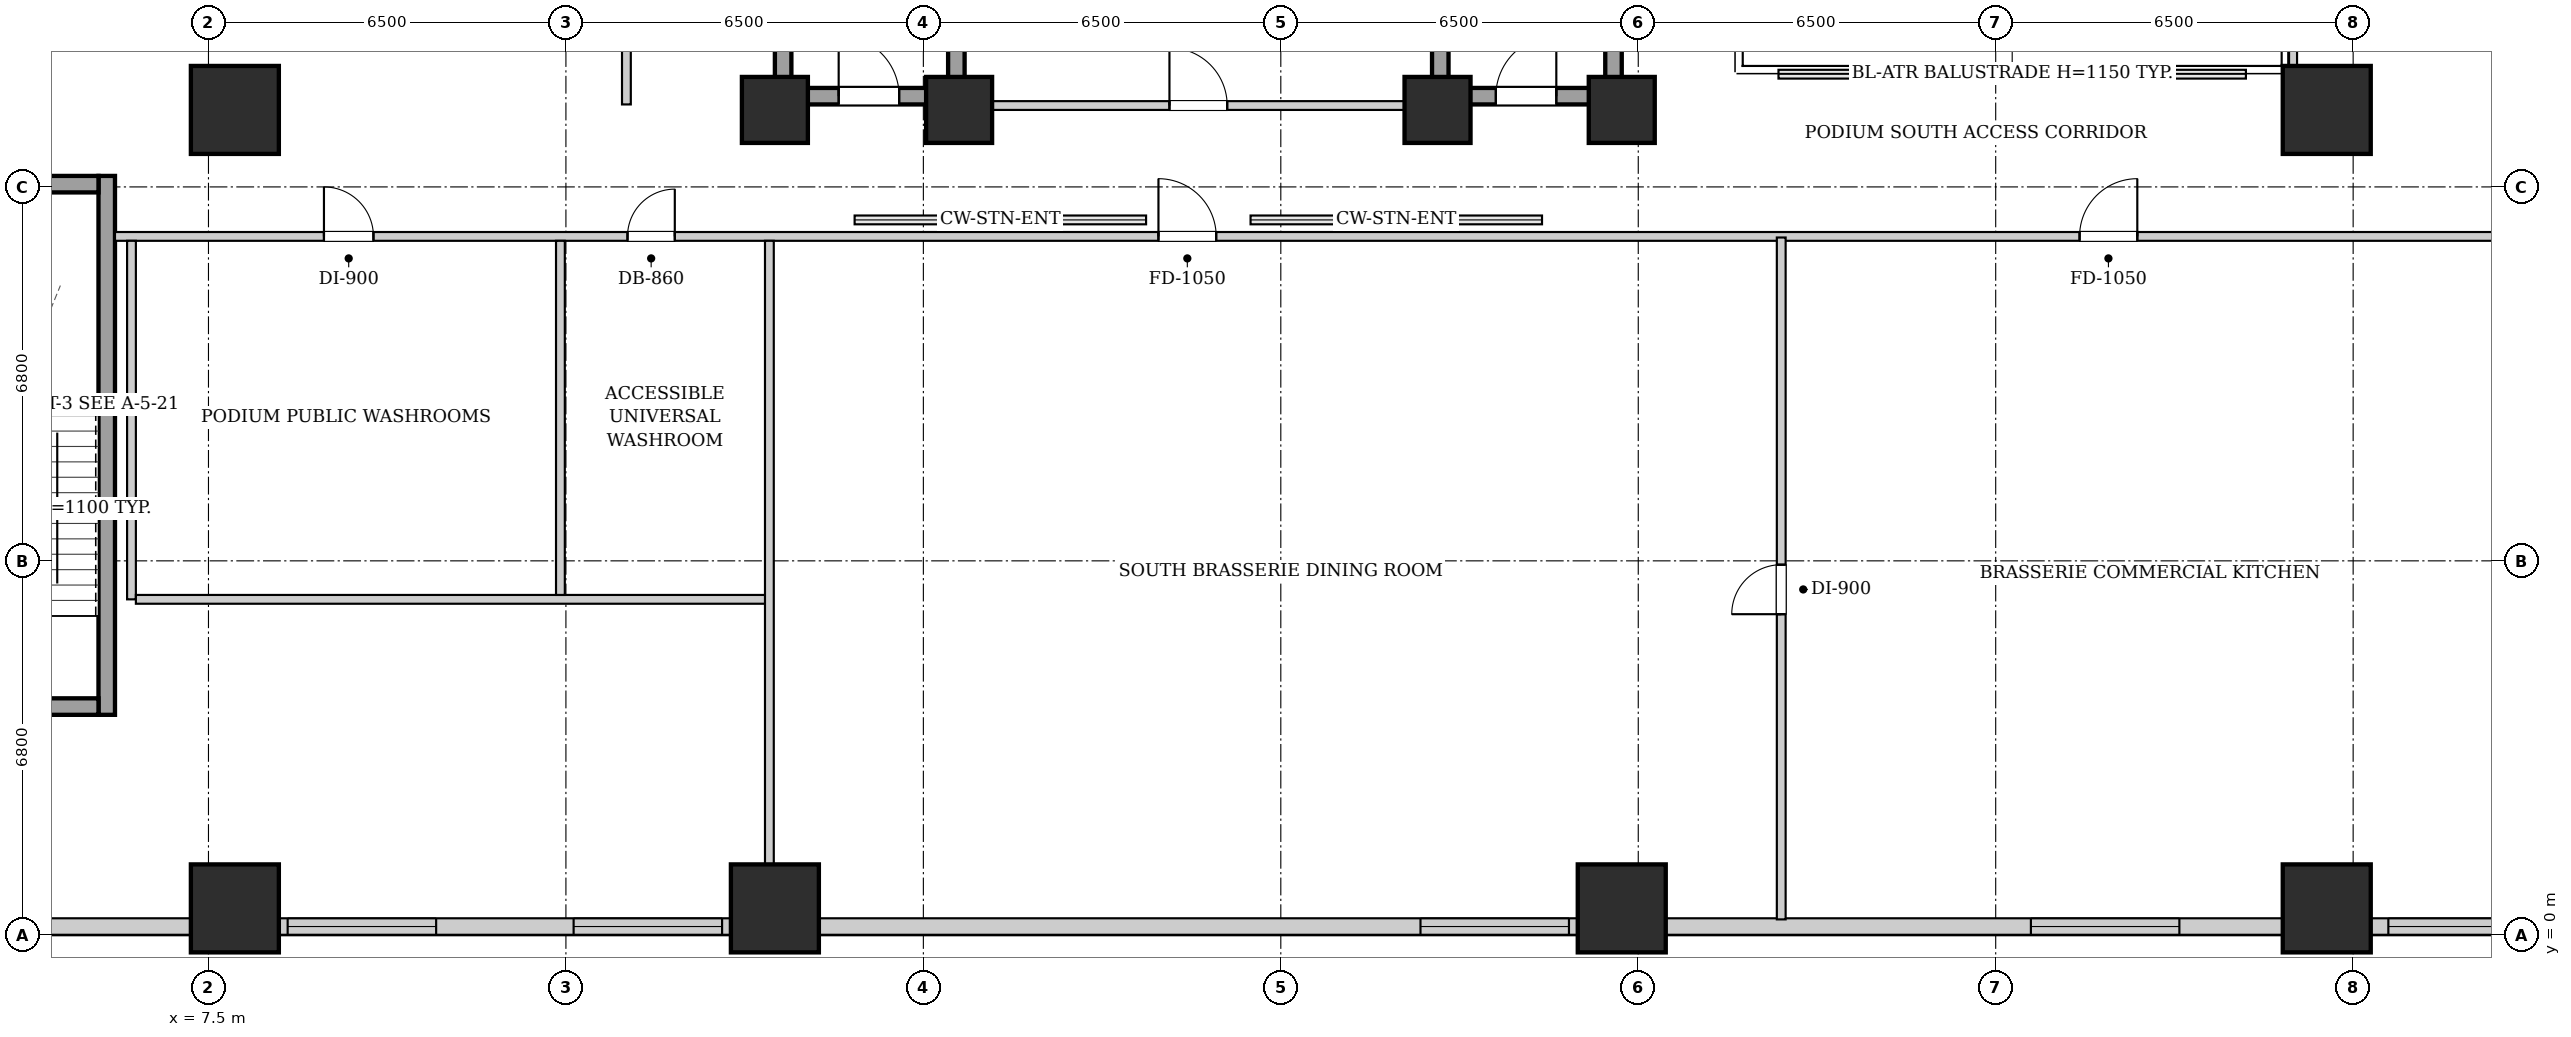
"""IFC4 building model, lengths in metres.
Left out: names, types, materials, properties, quantities, classifications, styles, units other than length and angle.
Written with IfcOpenShell. Run it as: python <this file> out.ifc"""

import sys

from ifc_helpers import new_model, si_unit, direction, frame, frame_2d, origin, origin_2d, place, context, subcontext, project, spatial, rectangle, extrude, element, fill, save


model = new_model("IFC4")
c1 = context("Model", 3, precision=1e-05, world=origin(), true_north=direction((0.0, 1.0)))
c2 = subcontext(c1, "Body", "Model", "MODEL_VIEW")
j1 = project(units=[si_unit("LENGTHUNIT", "METRE"), si_unit("PLANEANGLEUNIT", "RADIAN")], contexts=[c1])
p1 = place(None, origin())
s1 = spatial("IfcSite", under=j1, at=p1, CompositionType="ELEMENT")
p2 = place(p1, origin())
s2 = spatial("IfcBuilding", under=s1, at=p2, CompositionType="ELEMENT")
p3 = place(p2, frame((0.0, 0.0, 6.0)))
s3 = spatial("IfcBuildingStorey", under=s2, at=p3, CompositionType="ELEMENT", Elevation=6.0)
for number, where, z_axis, x_axis in (
    (1, (7.98, 0.48, 0.0), (0.0, 0.0, 1.0), (1.0, 0.0, 0.0)),
    (2, (7.98, 15.0, 0.0), (0.0, 0.0, 1.0), (1.0, 0.0, 0.0)),
    (3, (46.02, 0.48, 0.0), (0.0, 0.0, 1.0), (1.0, 0.0, 0.0)),
    (4, (46.02, 15.0, 0.0), (0.0, 0.0, 1.0), (1.0, 0.0, 0.0)),
    (5, (17.8, 0.48, 0.0), (0.0, 0.0, 1.0), (1.0, 0.0, 0.0)),
    (6, (33.2, 0.48, 0.0), (0.0, 0.0, 1.0), (1.0, 0.0, 0.0)),
):
    element("IfcColumn", number, at=place(p3, frame(where, z_axis=z_axis, x_axis=x_axis)), inside=s3, PredefinedType="COLUMN", context=c2, shape_type="SweptSolid", body=[
        extrude(rectangle(XDim=1.6, YDim=1.6, at=origin_2d()), origin(), (0.0, 0.0, 1.0), 5.2),
    ])
for number, where, z_axis, x_axis in (
    (7, (17.8, 15.0, 0.0), (0.0, 0.0, 1.0), (1.0, 0.0, 0.0)),
    (8, (21.15, 15.0, 0.0), (0.0, 0.0, 1.0), (1.0, 0.0, 0.0)),
    (9, (29.85, 15.0, 0.0), (0.0, 0.0, 1.0), (1.0, 0.0, 0.0)),
    (10, (33.2, 15.0, 0.0), (0.0, 0.0, 1.0), (1.0, 0.0, 0.0)),
):
    element("IfcColumn", number, at=place(p3, frame(where, z_axis=z_axis, x_axis=x_axis)), inside=s3, PredefinedType="COLUMN", context=c2, shape_type="SweptSolid", body=[
        extrude(rectangle(XDim=1.2, YDim=1.2, at=origin_2d()), origin(), (0.0, 0.0, 1.0), 5.2),
    ])
p4 = place(p3, frame((53.84, 0.15, 0.0), z_axis=(0.0, 0.0, 1.0), x_axis=(-1.0, 0.0, 0.0)))
e11 = element("IfcWall", 11, at=p4, inside=s3, PredefinedType="SOLIDWALL", context=c2, shape_type="SweptSolid", body=[
    extrude(rectangle(XDim=53.68, YDim=0.3, at=frame_2d((26.84, 0.0))), origin(), (0.0, 0.0, 1.0), 3.765),
])
p5 = place(p4, frame((4.0, 0.0, 0.9)))
e12 = element("IfcOpeningElement", 12, at=p5, cuts=e11, PredefinedType="OPENING", context=c2, shape_type="SweptSolid", body=[
    extrude(rectangle(XDim=2.7, YDim=2.1, at=frame_2d((1.35, 1.05))), frame((0.0, 0.16, 0.0), z_axis=(0.0, -1.0, 0.0), x_axis=(1.0, 0.0, 0.0)), (0.0, 0.0, 1.0), 0.32),
])
p6 = place(p4, frame((10.5, 0.0, 0.9)))
e13 = element("IfcOpeningElement", 13, at=p6, cuts=e11, PredefinedType="OPENING", context=c2, shape_type="SweptSolid", body=[
    extrude(rectangle(XDim=2.7, YDim=2.1, at=frame_2d((1.35, 1.05))), frame((0.0, 0.16, 0.0), z_axis=(0.0, -1.0, 0.0), x_axis=(1.0, 0.0, 0.0)), (0.0, 0.0, 1.0), 0.32),
])
p7 = place(p4, frame((21.6, 0.0, 0.9)))
e14 = element("IfcOpeningElement", 14, at=p7, cuts=e11, PredefinedType="OPENING", context=c2, shape_type="SweptSolid", body=[
    extrude(rectangle(XDim=2.7, YDim=2.1, at=frame_2d((1.35, 1.05))), frame((0.0, 0.16, 0.0), z_axis=(0.0, -1.0, 0.0), x_axis=(1.0, 0.0, 0.0)), (0.0, 0.0, 1.0), 0.32),
])
p8 = place(p4, frame((37.0, 0.0, 0.9)))
e15 = element("IfcOpeningElement", 15, at=p8, cuts=e11, PredefinedType="OPENING", context=c2, shape_type="SweptSolid", body=[
    extrude(rectangle(XDim=2.7, YDim=2.1, at=frame_2d((1.35, 1.05))), frame((0.0, 0.16, 0.0), z_axis=(0.0, -1.0, 0.0), x_axis=(1.0, 0.0, 0.0)), (0.0, 0.0, 1.0), 0.32),
])
p9 = place(p4, frame((42.2, 0.0, 0.9)))
e16 = element("IfcOpeningElement", 16, at=p9, cuts=e11, PredefinedType="OPENING", context=c2, shape_type="SweptSolid", body=[
    extrude(rectangle(XDim=2.7, YDim=2.1, at=frame_2d((1.35, 1.05))), frame((0.0, 0.16, 0.0), z_axis=(0.0, -1.0, 0.0), x_axis=(1.0, 0.0, 0.0)), (0.0, 0.0, 1.0), 0.32),
])
for number, where, z_axis, x_axis in (
    (17, (17.95, 15.1, 0.0), (0.0, 0.0, 1.0), (0.0, 1.0, 0.0)),
    (18, (21.1, 15.1, 0.0), (0.0, 0.0, 1.0), (0.0, 1.0, 0.0)),
):
    element("IfcWall", number, at=place(p3, frame(where, z_axis=z_axis, x_axis=x_axis)), inside=s3, PredefinedType="SHEAR", context=c2, shape_type="SweptSolid", body=[
        extrude(rectangle(XDim=9.0, YDim=0.3, at=frame_2d((4.5, 0.0))), origin(), (0.0, 0.0, 1.0), 4.88),
    ])
p10 = place(p3, frame((18.1, 15.25, 0.0), z_axis=(0.0, 0.0, 1.0), x_axis=(1.0, 0.0, 0.0)))
e19 = element("IfcWall", 19, at=p10, inside=s3, PredefinedType="SHEAR", context=c2, shape_type="SweptSolid", body=[
    extrude(rectangle(XDim=2.85, YDim=0.3, at=frame_2d((1.425, 0.0))), origin(), (0.0, 0.0, 1.0), 4.88),
])
p11 = place(p10, frame((0.86, 0.0, 0.0)))
e20 = element("IfcOpeningElement", 20, at=p11, cuts=e19, PredefinedType="OPENING", context=c2, shape_type="SweptSolid", body=[
    extrude(rectangle(XDim=1.1, YDim=2.05, at=frame_2d((0.55, 1.025))), frame((0.0, 0.16, 0.0), z_axis=(0.0, -1.0, 0.0), x_axis=(1.0, 0.0, 0.0)), (0.0, 0.0, 1.0), 0.32),
])
for number, where, z_axis, x_axis in (
    (21, (29.9, 15.1, 0.0), (0.0, 0.0, 1.0), (0.0, 1.0, 0.0)),
    (22, (33.05, 15.1, 0.0), (0.0, 0.0, 1.0), (0.0, 1.0, 0.0)),
):
    element("IfcWall", number, at=place(p3, frame(where, z_axis=z_axis, x_axis=x_axis)), inside=s3, PredefinedType="SHEAR", context=c2, shape_type="SweptSolid", body=[
        extrude(rectangle(XDim=9.0, YDim=0.3, at=frame_2d((4.5, 0.0))), origin(), (0.0, 0.0, 1.0), 4.88),
    ])
p12 = place(p3, frame((30.05, 15.25, 0.0), z_axis=(0.0, 0.0, 1.0), x_axis=(1.0, 0.0, 0.0)))
e23 = element("IfcWall", 23, at=p12, inside=s3, PredefinedType="SHEAR", context=c2, shape_type="SweptSolid", body=[
    extrude(rectangle(XDim=2.85, YDim=0.3, at=frame_2d((1.425, 0.0))), origin(), (0.0, 0.0, 1.0), 4.88),
])
p13 = place(p12, frame((0.86, 0.0, 0.0)))
e24 = element("IfcOpeningElement", 24, at=p13, cuts=e23, PredefinedType="OPENING", context=c2, shape_type="SweptSolid", body=[
    extrude(rectangle(XDim=1.1, YDim=2.05, at=frame_2d((0.55, 1.025))), frame((0.0, 0.16, 0.0), z_axis=(0.0, -1.0, 0.0), x_axis=(1.0, 0.0, 0.0)), (0.0, 0.0, 1.0), 0.32),
])
p14 = place(p3, frame((5.65, 4.0, 0.0), z_axis=(0.0, 0.0, 1.0), x_axis=(0.0, 1.0, 0.0)))
e25 = element("IfcWall", 25, at=p14, inside=s3, PredefinedType="SHEAR", context=c2, shape_type="SweptSolid", body=[
    extrude(rectangle(XDim=9.8, YDim=0.3, at=frame_2d((4.9, 0.0))), origin(), (0.0, 0.0, 1.0), 4.88),
])
p15 = place(p3, frame((2.35, 13.65, 0.0), z_axis=(0.0, 0.0, 1.0), x_axis=(1.0, 0.0, 0.0)))
e26 = element("IfcWall", 26, at=p15, inside=s3, PredefinedType="SHEAR", context=c2, shape_type="SweptSolid", body=[
    extrude(rectangle(XDim=3.15, YDim=0.3, at=frame_2d((1.575, 0.0))), origin(), (0.0, 0.0, 1.0), 4.88),
])
p16 = place(p3, frame((2.35, 4.15, 0.0), z_axis=(0.0, 0.0, 1.0), x_axis=(1.0, 0.0, 0.0)))
e27 = element("IfcWall", 27, at=p16, inside=s3, PredefinedType="SHEAR", context=c2, shape_type="SweptSolid", body=[
    extrude(rectangle(XDim=3.15, YDim=0.3, at=frame_2d((1.575, 0.0))), origin(), (0.0, 0.0, 1.0), 4.88),
])
p17 = place(p16, frame((1.02, 0.0, 0.0)))
e28 = element("IfcOpeningElement", 28, at=p17, cuts=e27, PredefinedType="OPENING", context=c2, shape_type="SweptSolid", body=[
    extrude(rectangle(XDim=1.1, YDim=2.05, at=frame_2d((0.55, 1.025))), frame((0.0, 0.16, 0.0), z_axis=(0.0, -1.0, 0.0), x_axis=(1.0, 0.0, 0.0)), (0.0, 0.0, 1.0), 0.32),
])
p18 = place(p3, frame((21.25, 15.08, 0.0), z_axis=(0.0, 0.0, 1.0), x_axis=(1.0, 0.0, 0.0)))
e29 = element("IfcWall", 29, at=p18, inside=s3, PredefinedType="PARTITIONING", context=c2, shape_type="SweptSolid", body=[
    extrude(rectangle(XDim=8.5, YDim=0.16, at=frame_2d((4.25, 0.0))), origin(), (0.0, 0.0, 1.0), 4.88),
])
p19 = place(p18, frame((3.725, 0.0, 0.0)))
e30 = element("IfcOpeningElement", 30, at=p19, cuts=e29, PredefinedType="OPENING", context=c2, shape_type="SweptSolid", body=[
    extrude(rectangle(XDim=1.05, YDim=2.05, at=frame_2d((0.525, 1.025))), frame((0.0, 0.09, 0.0), z_axis=(0.0, -1.0, 0.0), x_axis=(1.0, 0.0, 0.0)), (0.0, 0.0, 1.0), 0.18),
])
p20 = place(p3, frame((5.8, 12.7, 0.0), z_axis=(0.0, 0.0, 1.0), x_axis=(1.0, 0.0, 0.0)))
e31 = element("IfcWall", 31, at=p20, inside=s3, PredefinedType="PARTITIONING", context=c2, shape_type="SweptSolid", body=[
    extrude(rectangle(XDim=47.92, YDim=0.16, at=frame_2d((23.96, 0.0))), origin(), (0.0, 0.0, 1.0), 4.88),
])
p21 = place(p20, frame((3.8, 0.0, 0.0)))
e32 = element("IfcOpeningElement", 32, at=p21, cuts=e31, PredefinedType="OPENING", context=c2, shape_type="SweptSolid", body=[
    extrude(rectangle(XDim=0.9, YDim=2.05, at=frame_2d((0.45, 1.025))), frame((0.0, 0.09, 0.0), z_axis=(0.0, -1.0, 0.0), x_axis=(1.0, 0.0, 0.0)), (0.0, 0.0, 1.0), 0.18),
])
p22 = place(p20, frame((9.32, 0.0, 0.0)))
e33 = element("IfcOpeningElement", 33, at=p22, cuts=e31, PredefinedType="OPENING", context=c2, shape_type="SweptSolid", body=[
    extrude(rectangle(XDim=0.86, YDim=2.05, at=frame_2d((0.43, 1.025))), frame((0.0, 0.09, 0.0), z_axis=(0.0, -1.0, 0.0), x_axis=(1.0, 0.0, 0.0)), (0.0, 0.0, 1.0), 0.18),
])
p23 = place(p20, frame((18.975, 0.0, 0.0)))
e34 = element("IfcOpeningElement", 34, at=p23, cuts=e31, PredefinedType="OPENING", context=c2, shape_type="SweptSolid", body=[
    extrude(rectangle(XDim=1.05, YDim=2.05, at=frame_2d((0.525, 1.025))), frame((0.0, 0.09, 0.0), z_axis=(0.0, -1.0, 0.0), x_axis=(1.0, 0.0, 0.0)), (0.0, 0.0, 1.0), 0.18),
])
p24 = place(p20, frame((35.725, 0.0, 0.0)))
e35 = element("IfcOpeningElement", 35, at=p24, cuts=e31, PredefinedType="OPENING", context=c2, shape_type="SweptSolid", body=[
    extrude(rectangle(XDim=1.05, YDim=2.05, at=frame_2d((0.525, 1.025))), frame((0.0, 0.09, 0.0), z_axis=(0.0, -1.0, 0.0), x_axis=(1.0, 0.0, 0.0)), (0.0, 0.0, 1.0), 0.18),
])
p25 = place(p3, frame((6.1, 6.1, 0.0), z_axis=(0.0, 0.0, 1.0), x_axis=(0.0, 1.0, 0.0)))
e36 = element("IfcWall", 36, at=p25, inside=s3, PredefinedType="PARTITIONING", context=c2, shape_type="SweptSolid", body=[
    extrude(rectangle(XDim=6.52, YDim=0.16, at=frame_2d((3.26, 0.0))), origin(), (0.0, 0.0, 1.0), 4.88),
])
p26 = place(p3, frame((6.18, 6.1, 0.0), z_axis=(0.0, 0.0, 1.0), x_axis=(1.0, 0.0, 0.0)))
e37 = element("IfcWall", 37, at=p26, inside=s3, PredefinedType="PARTITIONING", context=c2, shape_type="SweptSolid", body=[
    extrude(rectangle(XDim=11.5, YDim=0.16, at=frame_2d((5.75, 0.0))), origin(), (0.0, 0.0, 1.0), 4.88),
])
p27 = place(p3, frame((13.9, 6.18, 0.0), z_axis=(0.0, 0.0, 1.0), x_axis=(0.0, 1.0, 0.0)))
e38 = element("IfcWall", 38, at=p27, inside=s3, PredefinedType="PARTITIONING", context=c2, shape_type="SweptSolid", body=[
    extrude(rectangle(XDim=6.44, YDim=0.16, at=frame_2d((3.22, 0.0))), origin(), (0.0, 0.0, 1.0), 4.88),
])
p28 = place(p3, frame((17.7, 0.6, 0.0), z_axis=(0.0, 0.0, 1.0), x_axis=(0.0, 1.0, 0.0)))
e39 = element("IfcWall", 39, at=p28, inside=s3, PredefinedType="PARTITIONING", context=c2, shape_type="SweptSolid", body=[
    extrude(rectangle(XDim=12.02, YDim=0.16, at=frame_2d((6.01, 0.0))), origin(), (0.0, 0.0, 1.0), 3.765),
])
p29 = place(p3, frame((15.1, 15.1, 0.0), z_axis=(0.0, 0.0, 1.0), x_axis=(0.0, 1.0, 0.0)))
e40 = element("IfcWall", 40, at=p29, inside=s3, PredefinedType="PARTITIONING", context=c2, shape_type="SweptSolid", body=[
    extrude(rectangle(XDim=13.8, YDim=0.16, at=frame_2d((6.9, 0.0))), origin(), (0.0, 0.0, 1.0), 4.88),
])
p30 = place(p29, frame((6.475, 0.0, 0.0)))
e41 = element("IfcOpeningElement", 41, at=p30, cuts=e40, PredefinedType="OPENING", context=c2, shape_type="SweptSolid", body=[
    extrude(rectangle(XDim=1.05, YDim=2.05, at=frame_2d((0.525, 1.025))), frame((0.0, 0.09, 0.0), z_axis=(0.0, -1.0, 0.0), x_axis=(1.0, 0.0, 0.0)), (0.0, 0.0, 1.0), 0.18),
])
p31 = place(p3, frame((45.4, 15.1, 0.0), z_axis=(0.0, 0.0, 1.0), x_axis=(0.0, 1.0, 0.0)))
e42 = element("IfcWall", 42, at=p31, inside=s3, PredefinedType="PARTITIONING", context=c2, shape_type="SweptSolid", body=[
    extrude(rectangle(XDim=13.78, YDim=0.16, at=frame_2d((6.89, 0.0))), origin(), (0.0, 0.0, 1.0), 4.88),
])
p32 = place(p3, frame((36.1, 0.28, 0.0), z_axis=(0.0, 0.0, 1.0), x_axis=(0.0, 1.0, 0.0)))
e43 = element("IfcWall", 43, at=p32, inside=s3, PredefinedType="PARTITIONING", context=c2, shape_type="SweptSolid", body=[
    extrude(rectangle(XDim=12.4, YDim=0.16, at=frame_2d((6.2, 0.0))), origin(), (0.0, 0.0, 1.0), 4.88),
])
p33 = place(p32, frame((5.55, 0.0, 0.0)))
e44 = element("IfcOpeningElement", 44, at=p33, cuts=e43, PredefinedType="OPENING", context=c2, shape_type="SweptSolid", body=[
    extrude(rectangle(XDim=0.9, YDim=2.05, at=frame_2d((0.45, 1.025))), frame((0.0, 0.09, 0.0), z_axis=(0.0, -1.0, 0.0), x_axis=(1.0, 0.0, 0.0)), (0.0, 0.0, 1.0), 0.18),
])
p34 = place(p11, origin())
e45 = element("IfcDoor", 45, at=p34, inside=s3, OperationType="SINGLE_SWING_LEFT", PredefinedType="DOOR", context=c2, shape_type="SweptSolid", body=[
    extrude(rectangle(XDim=1.1, YDim=2.05, at=frame_2d((0.55, 1.025))), frame((0.0, 0.025, 0.0), z_axis=(0.0, -1.0, 0.0), x_axis=(1.0, 0.0, 0.0)), (0.0, 0.0, 1.0), 0.05),
])
fill(e20, e45)
p35 = place(p13, origin())
e46 = element("IfcDoor", 46, at=p35, inside=s3, OperationType="SINGLE_SWING_RIGHT", PredefinedType="DOOR", context=c2, shape_type="SweptSolid", body=[
    extrude(rectangle(XDim=1.1, YDim=2.05, at=frame_2d((0.55, 1.025))), frame((0.0, 0.025, 0.0), z_axis=(0.0, -1.0, 0.0), x_axis=(1.0, 0.0, 0.0)), (0.0, 0.0, 1.0), 0.05),
])
fill(e24, e46)
p36 = place(p19, origin())
e47 = element("IfcDoor", 47, at=p36, inside=s3, OperationType="SINGLE_SWING_LEFT", PredefinedType="DOOR", context=c2, shape_type="SweptSolid", body=[
    extrude(rectangle(XDim=1.05, YDim=2.05, at=frame_2d((0.525, 1.025))), frame((0.0, 0.025, 0.0), z_axis=(0.0, -1.0, 0.0), x_axis=(1.0, 0.0, 0.0)), (0.0, 0.0, 1.0), 0.05),
])
fill(e30, e47)
p37 = place(p21, origin())
e48 = element("IfcDoor", 48, at=p37, inside=s3, OperationType="SINGLE_SWING_LEFT", PredefinedType="DOOR", context=c2, shape_type="SweptSolid", body=[
    extrude(rectangle(XDim=0.9, YDim=2.05, at=frame_2d((0.45, 1.025))), frame((0.0, 0.025, 0.0), z_axis=(0.0, -1.0, 0.0), x_axis=(1.0, 0.0, 0.0)), (0.0, 0.0, 1.0), 0.05),
])
fill(e32, e48)
p38 = place(p22, origin())
e49 = element("IfcDoor", 49, at=p38, inside=s3, OperationType="SINGLE_SWING_RIGHT", PredefinedType="DOOR", context=c2, shape_type="SweptSolid", body=[
    extrude(rectangle(XDim=0.86, YDim=2.05, at=frame_2d((0.43, 1.025))), frame((0.0, 0.025, 0.0), z_axis=(0.0, -1.0, 0.0), x_axis=(1.0, 0.0, 0.0)), (0.0, 0.0, 1.0), 0.05),
])
fill(e33, e49)
p39 = place(p23, origin())
e50 = element("IfcDoor", 50, at=p39, inside=s3, OperationType="SINGLE_SWING_LEFT", PredefinedType="DOOR", context=c2, shape_type="SweptSolid", body=[
    extrude(rectangle(XDim=1.05, YDim=2.05, at=frame_2d((0.525, 1.025))), frame((0.0, 0.025, 0.0), z_axis=(0.0, -1.0, 0.0), x_axis=(1.0, 0.0, 0.0)), (0.0, 0.0, 1.0), 0.05),
])
fill(e34, e50)
p40 = place(p24, origin())
e51 = element("IfcDoor", 51, at=p40, inside=s3, OperationType="SINGLE_SWING_RIGHT", PredefinedType="DOOR", context=c2, shape_type="SweptSolid", body=[
    extrude(rectangle(XDim=1.05, YDim=2.05, at=frame_2d((0.525, 1.025))), frame((0.0, 0.025, 0.0), z_axis=(0.0, -1.0, 0.0), x_axis=(1.0, 0.0, 0.0)), (0.0, 0.0, 1.0), 0.05),
])
fill(e35, e51)
p41 = place(p33, origin())
e52 = element("IfcDoor", 52, at=p41, inside=s3, OperationType="SINGLE_SWING_LEFT", PredefinedType="DOOR", context=c2, shape_type="SweptSolid", body=[
    extrude(rectangle(XDim=0.9, YDim=2.05, at=frame_2d((0.45, 1.025))), frame((0.0, 0.025, 0.0), z_axis=(0.0, -1.0, 0.0), x_axis=(1.0, 0.0, 0.0)), (0.0, 0.0, 1.0), 0.05),
])
fill(e44, e52)
p42 = place(p5, origin())
e53 = element("IfcWindow", 53, at=p42, inside=s3, PartitioningType="TRIPLE_PANEL_VERTICAL", PredefinedType="WINDOW", context=c2, shape_type="SweptSolid", body=[
    extrude(rectangle(XDim=2.7, YDim=2.1, at=frame_2d((1.35, 1.05))), frame((0.0, 0.03, 0.0), z_axis=(0.0, -1.0, 0.0), x_axis=(1.0, 0.0, 0.0)), (0.0, 0.0, 1.0), 0.06),
])
fill(e12, e53)
p43 = place(p6, origin())
e54 = element("IfcWindow", 54, at=p43, inside=s3, PartitioningType="TRIPLE_PANEL_VERTICAL", PredefinedType="WINDOW", context=c2, shape_type="SweptSolid", body=[
    extrude(rectangle(XDim=2.7, YDim=2.1, at=frame_2d((1.35, 1.05))), frame((0.0, 0.03, 0.0), z_axis=(0.0, -1.0, 0.0), x_axis=(1.0, 0.0, 0.0)), (0.0, 0.0, 1.0), 0.06),
])
fill(e13, e54)
p44 = place(p7, origin())
e55 = element("IfcWindow", 55, at=p44, inside=s3, PartitioningType="TRIPLE_PANEL_VERTICAL", PredefinedType="WINDOW", context=c2, shape_type="SweptSolid", body=[
    extrude(rectangle(XDim=2.7, YDim=2.1, at=frame_2d((1.35, 1.05))), frame((0.0, 0.03, 0.0), z_axis=(0.0, -1.0, 0.0), x_axis=(1.0, 0.0, 0.0)), (0.0, 0.0, 1.0), 0.06),
])
fill(e14, e55)
p45 = place(p8, origin())
e56 = element("IfcWindow", 56, at=p45, inside=s3, PartitioningType="TRIPLE_PANEL_VERTICAL", PredefinedType="WINDOW", context=c2, shape_type="SweptSolid", body=[
    extrude(rectangle(XDim=2.7, YDim=2.1, at=frame_2d((1.35, 1.05))), frame((0.0, 0.03, 0.0), z_axis=(0.0, -1.0, 0.0), x_axis=(1.0, 0.0, 0.0)), (0.0, 0.0, 1.0), 0.06),
])
fill(e15, e56)
p46 = place(p9, origin())
e57 = element("IfcWindow", 57, at=p46, inside=s3, PartitioningType="TRIPLE_PANEL_VERTICAL", PredefinedType="WINDOW", context=c2, shape_type="SweptSolid", body=[
    extrude(rectangle(XDim=2.7, YDim=2.1, at=frame_2d((1.35, 1.05))), frame((0.0, 0.03, 0.0), z_axis=(0.0, -1.0, 0.0), x_axis=(1.0, 0.0, 0.0)), (0.0, 0.0, 1.0), 0.06),
])
fill(e16, e57)
save(model, sys.argv[1])
